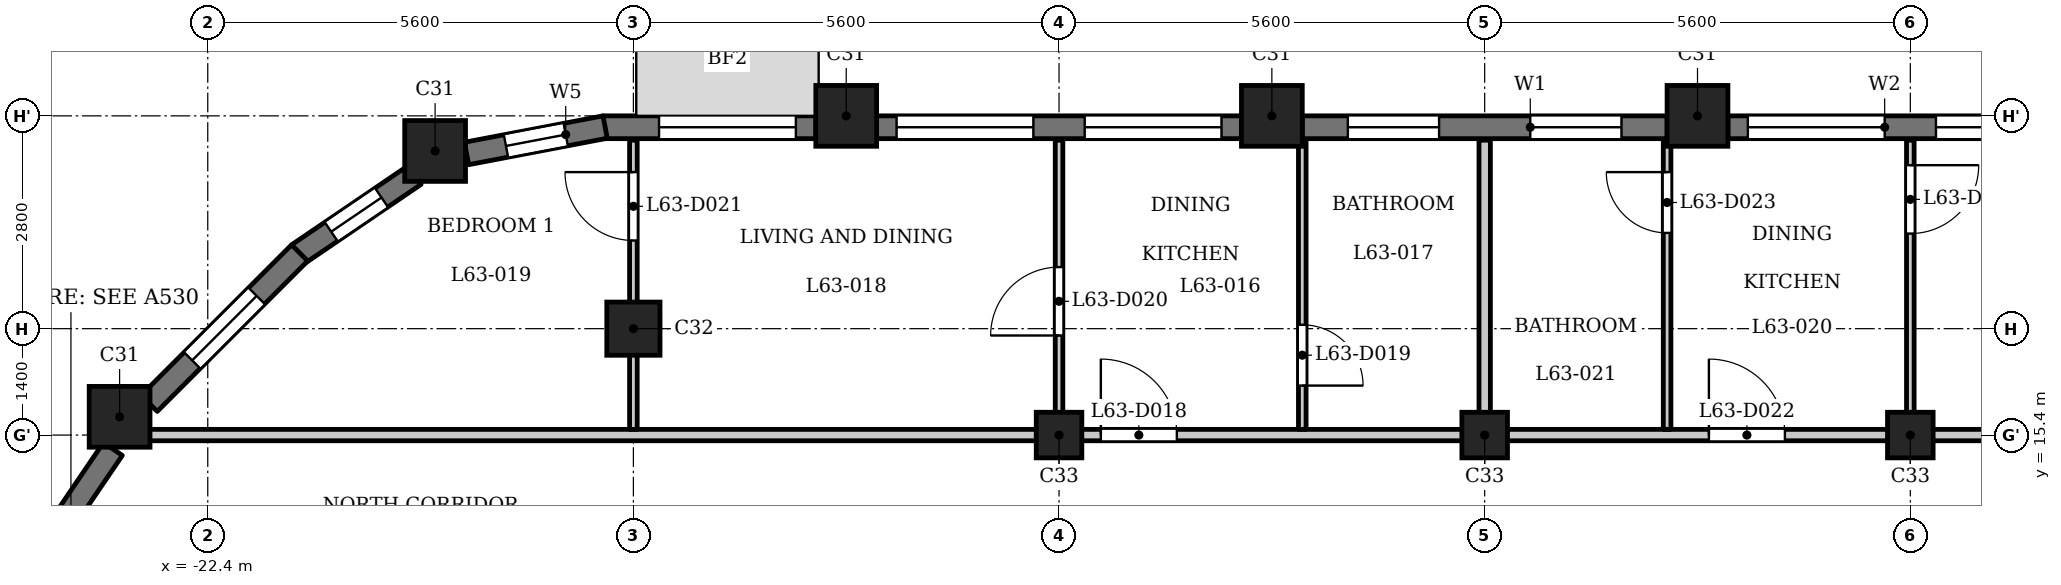
"""IFC4 building model, lengths in metres.
Left out: names, types, materials, properties, quantities, classifications, styles, units other than length and angle.
Written with IfcOpenShell. Run it as: python <this file> out.ifc"""

import sys

from ifc_helpers import new_model, si_unit, direction, frame, frame_2d, origin, origin_2d, place, context, subcontext, project, spatial, rectangle, extrude, element, fill, save


model = new_model("IFC4")
c1 = context("Model", 3, precision=1e-05, world=origin(), true_north=direction((0.0, 1.0)))
c2 = subcontext(c1, "Body", "Model", "MODEL_VIEW")
j1 = project(units=[si_unit("LENGTHUNIT", "METRE"), si_unit("PLANEANGLEUNIT", "RADIAN")], contexts=[c1])
p1 = place(None, origin())
s1 = spatial("IfcSite", under=j1, at=p1, CompositionType="ELEMENT")
p2 = place(p1, origin())
s2 = spatial("IfcBuilding", under=s1, at=p2, CompositionType="ELEMENT")
p3 = place(p2, frame((0.0, 0.0, 245.2)))
s3 = spatial("IfcBuildingStorey", under=s2, at=p3, CompositionType="ELEMENT", Elevation=245.2)
for number, where, z_axis, x_axis in (
    (1, (-2.8, 19.6, 0.0), (0.0, 0.0, 1.0), (1.0, 0.0, 0.0)),
    (2, (-8.4, 19.6, 0.0), (0.0, 0.0, 1.0), (1.0, 0.0, 0.0)),
    (3, (-14.0, 19.6, 0.0), (0.0, 0.0, 1.0), (1.0, 0.0, 0.0)),
    (4, (-19.409, 19.138, 0.0), (0.0, 0.0, 1.0), (1.0, 0.0, 0.0)),
    (5, (-23.56, 15.64, 0.0), (0.0, 0.0, 1.0), (1.0, 0.0, 0.0)),
):
    element("IfcColumn", number, at=place(p3, frame(where, z_axis=z_axis, x_axis=x_axis)), inside=s3, PredefinedType="COLUMN", context=c2, shape_type="SweptSolid", body=[
        extrude(rectangle(XDim=0.8, YDim=0.8, at=origin_2d()), origin(), (0.0, 0.0, 1.0), 3.5),
    ])
p4 = place(p3, frame((-16.8, 16.8, 0.0), z_axis=(0.0, 0.0, 1.0), x_axis=(1.0, 0.0, 0.0)))
e6 = element("IfcColumn", 6, at=p4, inside=s3, PredefinedType="COLUMN", context=c2, shape_type="SweptSolid", body=[
    extrude(rectangle(XDim=0.7, YDim=0.7, at=origin_2d()), origin(), (0.0, 0.0, 1.0), 3.5),
])
for number, where, z_axis, x_axis in (
    (7, (-11.2, 15.4, 0.0), (0.0, 0.0, 1.0), (1.0, 0.0, 0.0)),
    (8, (-5.6, 15.4, 0.0), (0.0, 0.0, 1.0), (1.0, 0.0, 0.0)),
    (9, (0.0, 15.4, 0.0), (0.0, 0.0, 1.0), (1.0, 0.0, 0.0)),
):
    element("IfcColumn", number, at=place(p3, frame(where, z_axis=z_axis, x_axis=x_axis)), inside=s3, PredefinedType="COLUMN", context=c2, shape_type="SweptSolid", body=[
        extrude(rectangle(XDim=0.6, YDim=0.6, at=origin_2d()), origin(), (0.0, 0.0, 1.0), 3.5),
    ])
p5 = place(p3, frame((2.4, 19.45, 0.0), z_axis=(0.0, 0.0, 1.0), x_axis=(-1.0, 0.0, 0.0)))
e10 = element("IfcWall", 10, at=p5, inside=s3, PredefinedType="SOLIDWALL", context=c2, shape_type="SweptSolid", body=[
    extrude(rectangle(XDim=4.8, YDim=0.3, at=frame_2d((2.4, 0.0))), origin(), (0.0, 0.0, 1.0), 2.55),
])
p6 = place(p5, frame((0.262, 0.0, 0.9)))
e11 = element("IfcOpeningElement", 11, at=p6, cuts=e10, PredefinedType="OPENING", context=c2, shape_type="SweptSolid", body=[
    extrude(rectangle(XDim=1.8, YDim=1.25, at=frame_2d((0.9, 0.625))), frame((0.0, 0.16, 0.0), z_axis=(0.0, -1.0, 0.0), x_axis=(1.0, 0.0, 0.0)), (0.0, 0.0, 1.0), 0.32),
])
p7 = place(p5, frame((2.738, 0.0, 0.9)))
e12 = element("IfcOpeningElement", 12, at=p7, cuts=e10, PredefinedType="OPENING", context=c2, shape_type="SweptSolid", body=[
    extrude(rectangle(XDim=1.8, YDim=1.25, at=frame_2d((0.9, 0.625))), frame((0.0, 0.16, 0.0), z_axis=(0.0, -1.0, 0.0), x_axis=(1.0, 0.0, 0.0)), (0.0, 0.0, 1.0), 0.32),
])
p8 = place(p3, frame((-3.2, 19.45, 0.0), z_axis=(0.0, 0.0, 1.0), x_axis=(-1.0, 0.0, 0.0)))
e13 = element("IfcWall", 13, at=p8, inside=s3, PredefinedType="SOLIDWALL", context=c2, shape_type="SweptSolid", body=[
    extrude(rectangle(XDim=4.8, YDim=0.3, at=frame_2d((2.4, 0.0))), origin(), (0.0, 0.0, 1.0), 2.55),
])
p9 = place(p8, frame((0.6, 0.0, 0.6)))
e14 = element("IfcOpeningElement", 14, at=p9, cuts=e13, PredefinedType="OPENING", context=c2, shape_type="SweptSolid", body=[
    extrude(rectangle(XDim=1.2, YDim=1.55, at=frame_2d((0.6, 0.775))), frame((0.0, 0.16, 0.0), z_axis=(0.0, -1.0, 0.0), x_axis=(1.0, 0.0, 0.0)), (0.0, 0.0, 1.0), 0.32),
])
p10 = place(p8, frame((3.0, 0.0, 0.6)))
e15 = element("IfcOpeningElement", 15, at=p10, cuts=e13, PredefinedType="OPENING", context=c2, shape_type="SweptSolid", body=[
    extrude(rectangle(XDim=1.2, YDim=1.55, at=frame_2d((0.6, 0.775))), frame((0.0, 0.16, 0.0), z_axis=(0.0, -1.0, 0.0), x_axis=(1.0, 0.0, 0.0)), (0.0, 0.0, 1.0), 0.32),
])
p11 = place(p3, frame((-8.8, 19.45, 0.0), z_axis=(0.0, 0.0, 1.0), x_axis=(-1.0, 0.0, 0.0)))
e16 = element("IfcWall", 16, at=p11, inside=s3, PredefinedType="SOLIDWALL", context=c2, shape_type="SweptSolid", body=[
    extrude(rectangle(XDim=4.8, YDim=0.3, at=frame_2d((2.4, 0.0))), origin(), (0.0, 0.0, 1.0), 2.55),
])
p12 = place(p11, frame((0.262, 0.0, 0.9)))
e17 = element("IfcOpeningElement", 17, at=p12, cuts=e16, PredefinedType="OPENING", context=c2, shape_type="SweptSolid", body=[
    extrude(rectangle(XDim=1.8, YDim=1.25, at=frame_2d((0.9, 0.625))), frame((0.0, 0.16, 0.0), z_axis=(0.0, -1.0, 0.0), x_axis=(1.0, 0.0, 0.0)), (0.0, 0.0, 1.0), 0.32),
])
p13 = place(p11, frame((2.738, 0.0, 0.9)))
e18 = element("IfcOpeningElement", 18, at=p13, cuts=e16, PredefinedType="OPENING", context=c2, shape_type="SweptSolid", body=[
    extrude(rectangle(XDim=1.8, YDim=1.25, at=frame_2d((0.9, 0.625))), frame((0.0, 0.16, 0.0), z_axis=(0.0, -1.0, 0.0), x_axis=(1.0, 0.0, 0.0)), (0.0, 0.0, 1.0), 0.32),
])
p14 = place(p3, frame((-14.4, 19.45, 0.0), z_axis=(0.0, 0.0, 1.0), x_axis=(-1.0, 0.0, 0.0)))
e19 = element("IfcWall", 19, at=p14, inside=s3, PredefinedType="SOLIDWALL", context=c2, shape_type="SweptSolid", body=[
    extrude(rectangle(XDim=2.8, YDim=0.3, at=frame_2d((1.4, 0.0))), origin(), (0.0, 0.0, 1.0), 2.55),
])
p15 = place(p14, frame((0.262, 0.0, 0.9)))
e20 = element("IfcOpeningElement", 20, at=p15, cuts=e19, PredefinedType="OPENING", context=c2, shape_type="SweptSolid", body=[
    extrude(rectangle(XDim=1.8, YDim=1.25, at=frame_2d((0.9, 0.625))), frame((0.0, 0.16, 0.0), z_axis=(0.0, -1.0, 0.0), x_axis=(1.0, 0.0, 0.0)), (0.0, 0.0, 1.0), 0.32),
])
p16 = place(p3, frame((-17.172, 19.453, 0.0), z_axis=(0.0, 0.0, 1.0), x_axis=(-0.982301706131, -0.187305520826, 0.0)))
e21 = element("IfcWall", 21, at=p16, inside=s3, PredefinedType="SOLIDWALL", context=c2, shape_type="SweptSolid", body=[
    extrude(rectangle(XDim=1.856, YDim=0.3, at=frame_2d((0.928, 0.0))), origin(), (0.0, 0.0, 1.0), 2.55),
])
p17 = place(p16, frame((0.528, 0.0, 0.6)))
e22 = element("IfcOpeningElement", 22, at=p17, cuts=e21, PredefinedType="OPENING", context=c2, shape_type="SweptSolid", body=[
    extrude(rectangle(XDim=0.8, YDim=1.55, at=frame_2d((0.4, 0.775))), frame((0.0, 0.16, 0.0), z_axis=(0.0, -1.0, 0.0), x_axis=(1.0, 0.0, 0.0)), (0.0, 0.0, 1.0), 0.32),
])
p18 = place(p3, frame((-19.678, 18.822, 0.0), z_axis=(0.0, 0.0, 1.0), x_axis=(-0.826997446962, -0.562205676526, 0.0)))
e23 = element("IfcWall", 23, at=p18, inside=s3, PredefinedType="SOLIDWALL", context=c2, shape_type="SweptSolid", body=[
    extrude(rectangle(XDim=1.856, YDim=0.3, at=frame_2d((0.928, 0.0))), origin(), (0.0, 0.0, 1.0), 2.55),
])
p19 = place(p18, frame((0.528, 0.0, 0.6)))
e24 = element("IfcOpeningElement", 24, at=p19, cuts=e23, PredefinedType="OPENING", context=c2, shape_type="SweptSolid", body=[
    extrude(rectangle(XDim=0.8, YDim=1.55, at=frame_2d((0.4, 0.775))), frame((0.0, 0.16, 0.0), z_axis=(0.0, -1.0, 0.0), x_axis=(1.0, 0.0, 0.0)), (0.0, 0.0, 1.0), 0.32),
])
p20 = place(p3, frame((-21.191, 17.797, 0.0), z_axis=(0.0, 0.0, 1.0), x_axis=(-0.707106781187, -0.707106781187, 0.0)))
e25 = element("IfcWall", 25, at=p20, inside=s3, PredefinedType="SOLIDWALL", context=c2, shape_type="SweptSolid", body=[
    extrude(rectangle(XDim=2.8, YDim=0.3, at=frame_2d((1.4, 0.0))), origin(), (0.0, 0.0, 1.0), 2.55),
])
p21 = place(p20, frame((0.8, 0.0, 0.6)))
e26 = element("IfcOpeningElement", 26, at=p21, cuts=e25, PredefinedType="OPENING", context=c2, shape_type="SweptSolid", body=[
    extrude(rectangle(XDim=1.2, YDim=1.55, at=frame_2d((0.6, 0.775))), frame((0.0, 0.16, 0.0), z_axis=(0.0, -1.0, 0.0), x_axis=(1.0, 0.0, 0.0)), (0.0, 0.0, 1.0), 0.32),
])
p22 = place(p3, frame((-23.648, 15.217, 0.0), z_axis=(0.0, 0.0, 1.0), x_axis=(-0.562043265151, -0.827107833416, 0.0)))
e27 = element("IfcWall", 27, at=p22, inside=s3, PredefinedType="SOLIDWALL", context=c2, shape_type="SweptSolid", body=[
    extrude(rectangle(XDim=1.377, YDim=0.3, at=frame_2d((0.688, 0.0))), origin(), (0.0, 0.0, 1.0), 2.55),
])
p23 = place(p3, frame((-23.55, 15.4, 0.0), z_axis=(0.0, 0.0, 1.0), x_axis=(1.0, 0.0, 0.0)))
e28 = element("IfcWall", 28, at=p23, inside=s3, PredefinedType="PARTITIONING", context=c2, shape_type="SweptSolid", body=[
    extrude(rectangle(XDim=46.872, YDim=0.15, at=frame_2d((23.436, 0.0))), origin(), (0.0, 0.0, 1.0), 3.2),
])
p24 = place(p23, frame((12.9, 0.0, 0.0)))
e29 = element("IfcOpeningElement", 29, at=p24, cuts=e28, PredefinedType="OPENING", context=c2, shape_type="SweptSolid", body=[
    extrude(rectangle(XDim=1.0, YDim=2.1, at=frame_2d((0.5, 1.05))), frame((0.0, 0.085, 0.0), z_axis=(0.0, -1.0, 0.0), x_axis=(1.0, 0.0, 0.0)), (0.0, 0.0, 1.0), 0.17),
])
p25 = place(p23, frame((20.9, 0.0, 0.0)))
e30 = element("IfcOpeningElement", 30, at=p25, cuts=e28, PredefinedType="OPENING", context=c2, shape_type="SweptSolid", body=[
    extrude(rectangle(XDim=1.0, YDim=2.1, at=frame_2d((0.5, 1.05))), frame((0.0, 0.085, 0.0), z_axis=(0.0, -1.0, 0.0), x_axis=(1.0, 0.0, 0.0)), (0.0, 0.0, 1.0), 0.17),
])
p26 = place(p23, frame((37.7, 0.0, 0.0)))
e31 = element("IfcOpeningElement", 31, at=p26, cuts=e28, PredefinedType="OPENING", context=c2, shape_type="SweptSolid", body=[
    extrude(rectangle(XDim=1.0, YDim=2.1, at=frame_2d((0.5, 1.05))), frame((0.0, 0.085, 0.0), z_axis=(0.0, -1.0, 0.0), x_axis=(1.0, 0.0, 0.0)), (0.0, 0.0, 1.0), 0.17),
])
p27 = place(p3, frame((-16.8, 15.475, 0.0), z_axis=(0.0, 0.0, 1.0), x_axis=(0.0, 1.0, 0.0)))
e32 = element("IfcWall", 32, at=p27, inside=s3, PredefinedType="PARTITIONING", context=c2, shape_type="SweptSolid", body=[
    extrude(rectangle(XDim=3.805, YDim=0.1, at=frame_2d((1.902, 0.0))), origin(), (0.0, 0.0, 1.0), 3.2),
])
p28 = place(p27, frame((2.485, 0.0, 0.0)))
e33 = element("IfcOpeningElement", 33, at=p28, cuts=e32, PredefinedType="OPENING", context=c2, shape_type="SweptSolid", body=[
    extrude(rectangle(XDim=0.9, YDim=2.1, at=frame_2d((0.45, 1.05))), frame((0.0, 0.06, 0.0), z_axis=(0.0, -1.0, 0.0), x_axis=(1.0, 0.0, 0.0)), (0.0, 0.0, 1.0), 0.12),
])
p29 = place(p3, frame((-11.2, 15.475, 0.0), z_axis=(0.0, 0.0, 1.0), x_axis=(0.0, 1.0, 0.0)))
e34 = element("IfcWall", 34, at=p29, inside=s3, PredefinedType="PARTITIONING", context=c2, shape_type="SweptSolid", body=[
    extrude(rectangle(XDim=3.805, YDim=0.1, at=frame_2d((1.902, 0.0))), origin(), (0.0, 0.0, 1.0), 3.2),
])
p30 = place(p29, frame((1.235, 0.0, 0.0)))
e35 = element("IfcOpeningElement", 35, at=p30, cuts=e34, PredefinedType="OPENING", context=c2, shape_type="SweptSolid", body=[
    extrude(rectangle(XDim=0.9, YDim=2.1, at=frame_2d((0.45, 1.05))), frame((0.0, 0.06, 0.0), z_axis=(0.0, -1.0, 0.0), x_axis=(1.0, 0.0, 0.0)), (0.0, 0.0, 1.0), 0.12),
])
p31 = place(p3, frame((-8.0, 15.475, 0.0), z_axis=(0.0, 0.0, 1.0), x_axis=(0.0, 1.0, 0.0)))
e36 = element("IfcWall", 36, at=p31, inside=s3, PredefinedType="PARTITIONING", context=c2, shape_type="SweptSolid", body=[
    extrude(rectangle(XDim=3.805, YDim=0.1, at=frame_2d((1.902, 0.0))), origin(), (0.0, 0.0, 1.0), 3.2),
])
p32 = place(p31, frame((0.576, 0.0, 0.0)))
e37 = element("IfcOpeningElement", 37, at=p32, cuts=e36, PredefinedType="OPENING", context=c2, shape_type="SweptSolid", body=[
    extrude(rectangle(XDim=0.8, YDim=2.1, at=frame_2d((0.4, 1.05))), frame((0.0, 0.06, 0.0), z_axis=(0.0, -1.0, 0.0), x_axis=(1.0, 0.0, 0.0)), (0.0, 0.0, 1.0), 0.12),
])
p33 = place(p3, frame((-5.6, 15.475, 0.0), z_axis=(0.0, 0.0, 1.0), x_axis=(0.0, 1.0, 0.0)))
e38 = element("IfcWall", 38, at=p33, inside=s3, PredefinedType="PARTITIONING", context=c2, shape_type="SweptSolid", body=[
    extrude(rectangle(XDim=3.805, YDim=0.15, at=frame_2d((1.902, 0.0))), origin(), (0.0, 0.0, 1.0), 3.2),
])
p34 = place(p3, frame((-3.2, 15.475, 0.0), z_axis=(0.0, 0.0, 1.0), x_axis=(0.0, 1.0, 0.0)))
e39 = element("IfcWall", 39, at=p34, inside=s3, PredefinedType="PARTITIONING", context=c2, shape_type="SweptSolid", body=[
    extrude(rectangle(XDim=3.805, YDim=0.1, at=frame_2d((1.902, 0.0))), origin(), (0.0, 0.0, 1.0), 3.2),
])
p35 = place(p34, frame((2.585, 0.0, 0.0)))
e40 = element("IfcOpeningElement", 40, at=p35, cuts=e39, PredefinedType="OPENING", context=c2, shape_type="SweptSolid", body=[
    extrude(rectangle(XDim=0.8, YDim=2.1, at=frame_2d((0.4, 1.05))), frame((0.0, 0.06, 0.0), z_axis=(0.0, -1.0, 0.0), x_axis=(1.0, 0.0, 0.0)), (0.0, 0.0, 1.0), 0.12),
])
p36 = place(p3, frame((0.0, 15.475, 0.0), z_axis=(0.0, 0.0, 1.0), x_axis=(0.0, 1.0, 0.0)))
e41 = element("IfcWall", 41, at=p36, inside=s3, PredefinedType="PARTITIONING", context=c2, shape_type="SweptSolid", body=[
    extrude(rectangle(XDim=3.805, YDim=0.1, at=frame_2d((1.902, 0.0))), origin(), (0.0, 0.0, 1.0), 3.2),
])
p37 = place(p36, frame((2.576, 0.0, 0.0)))
e42 = element("IfcOpeningElement", 42, at=p37, cuts=e41, PredefinedType="OPENING", context=c2, shape_type="SweptSolid", body=[
    extrude(rectangle(XDim=0.9, YDim=2.1, at=frame_2d((0.45, 1.05))), frame((0.0, 0.06, 0.0), z_axis=(0.0, -1.0, 0.0), x_axis=(1.0, 0.0, 0.0)), (0.0, 0.0, 1.0), 0.12),
])
p38 = place(p24, origin())
e43 = element("IfcDoor", 43, at=p38, inside=s3, OperationType="SINGLE_SWING_RIGHT", PredefinedType="DOOR", context=c2, shape_type="SweptSolid", body=[
    extrude(rectangle(XDim=1.0, YDim=2.1, at=frame_2d((0.5, 1.05))), frame((0.0, 0.025, 0.0), z_axis=(0.0, -1.0, 0.0), x_axis=(1.0, 0.0, 0.0)), (0.0, 0.0, 1.0), 0.05),
])
fill(e29, e43)
p39 = place(p32, origin())
e44 = element("IfcDoor", 44, at=p39, inside=s3, OperationType="SINGLE_SWING_LEFT", PredefinedType="DOOR", context=c2, shape_type="SweptSolid", body=[
    extrude(rectangle(XDim=0.8, YDim=2.1, at=frame_2d((0.4, 1.05))), frame((0.0, 0.025, 0.0), z_axis=(0.0, -1.0, 0.0), x_axis=(1.0, 0.0, 0.0)), (0.0, 0.0, 1.0), 0.05),
])
fill(e37, e44)
p40 = place(p30, origin())
e45 = element("IfcDoor", 45, at=p40, inside=s3, OperationType="SINGLE_SWING_RIGHT", PredefinedType="DOOR", context=c2, shape_type="SweptSolid", body=[
    extrude(rectangle(XDim=0.9, YDim=2.1, at=frame_2d((0.45, 1.05))), frame((0.0, 0.025, 0.0), z_axis=(0.0, -1.0, 0.0), x_axis=(1.0, 0.0, 0.0)), (0.0, 0.0, 1.0), 0.05),
])
fill(e35, e45)
p41 = place(p28, origin())
e46 = element("IfcDoor", 46, at=p41, inside=s3, OperationType="SINGLE_SWING_LEFT", PredefinedType="DOOR", context=c2, shape_type="SweptSolid", body=[
    extrude(rectangle(XDim=0.9, YDim=2.1, at=frame_2d((0.45, 1.05))), frame((0.0, 0.025, 0.0), z_axis=(0.0, -1.0, 0.0), x_axis=(1.0, 0.0, 0.0)), (0.0, 0.0, 1.0), 0.05),
])
fill(e33, e46)
p42 = place(p25, origin())
e47 = element("IfcDoor", 47, at=p42, inside=s3, OperationType="SINGLE_SWING_RIGHT", PredefinedType="DOOR", context=c2, shape_type="SweptSolid", body=[
    extrude(rectangle(XDim=1.0, YDim=2.1, at=frame_2d((0.5, 1.05))), frame((0.0, 0.025, 0.0), z_axis=(0.0, -1.0, 0.0), x_axis=(1.0, 0.0, 0.0)), (0.0, 0.0, 1.0), 0.05),
])
fill(e30, e47)
p43 = place(p35, origin())
e48 = element("IfcDoor", 48, at=p43, inside=s3, OperationType="SINGLE_SWING_LEFT", PredefinedType="DOOR", context=c2, shape_type="SweptSolid", body=[
    extrude(rectangle(XDim=0.8, YDim=2.1, at=frame_2d((0.4, 1.05))), frame((0.0, 0.025, 0.0), z_axis=(0.0, -1.0, 0.0), x_axis=(1.0, 0.0, 0.0)), (0.0, 0.0, 1.0), 0.05),
])
fill(e40, e48)
p44 = place(p37, origin())
e49 = element("IfcDoor", 49, at=p44, inside=s3, OperationType="SINGLE_SWING_RIGHT", PredefinedType="DOOR", context=c2, shape_type="SweptSolid", body=[
    extrude(rectangle(XDim=0.9, YDim=2.1, at=frame_2d((0.45, 1.05))), frame((0.0, 0.025, 0.0), z_axis=(0.0, -1.0, 0.0), x_axis=(1.0, 0.0, 0.0)), (0.0, 0.0, 1.0), 0.05),
])
fill(e42, e49)
p45 = place(p6, origin())
e50 = element("IfcWindow", 50, at=p45, inside=s3, PartitioningType="SINGLE_PANEL", PredefinedType="WINDOW", context=c2, shape_type="SweptSolid", body=[
    extrude(rectangle(XDim=1.8, YDim=1.25, at=frame_2d((0.9, 0.625))), frame((0.0, 0.03, 0.0), z_axis=(0.0, -1.0, 0.0), x_axis=(1.0, 0.0, 0.0)), (0.0, 0.0, 1.0), 0.06),
])
fill(e11, e50)
p46 = place(p7, origin())
e51 = element("IfcWindow", 51, at=p46, inside=s3, PartitioningType="SINGLE_PANEL", PredefinedType="WINDOW", context=c2, shape_type="SweptSolid", body=[
    extrude(rectangle(XDim=1.8, YDim=1.25, at=frame_2d((0.9, 0.625))), frame((0.0, 0.03, 0.0), z_axis=(0.0, -1.0, 0.0), x_axis=(1.0, 0.0, 0.0)), (0.0, 0.0, 1.0), 0.06),
])
fill(e12, e51)
p47 = place(p9, origin())
e52 = element("IfcWindow", 52, at=p47, inside=s3, PartitioningType="SINGLE_PANEL", PredefinedType="WINDOW", context=c2, shape_type="SweptSolid", body=[
    extrude(rectangle(XDim=1.2, YDim=1.55, at=frame_2d((0.6, 0.775))), frame((0.0, 0.03, 0.0), z_axis=(0.0, -1.0, 0.0), x_axis=(1.0, 0.0, 0.0)), (0.0, 0.0, 1.0), 0.06),
])
fill(e14, e52)
p48 = place(p10, origin())
e53 = element("IfcWindow", 53, at=p48, inside=s3, PartitioningType="SINGLE_PANEL", PredefinedType="WINDOW", context=c2, shape_type="SweptSolid", body=[
    extrude(rectangle(XDim=1.2, YDim=1.55, at=frame_2d((0.6, 0.775))), frame((0.0, 0.03, 0.0), z_axis=(0.0, -1.0, 0.0), x_axis=(1.0, 0.0, 0.0)), (0.0, 0.0, 1.0), 0.06),
])
fill(e15, e53)
p49 = place(p12, origin())
e54 = element("IfcWindow", 54, at=p49, inside=s3, PartitioningType="SINGLE_PANEL", PredefinedType="WINDOW", context=c2, shape_type="SweptSolid", body=[
    extrude(rectangle(XDim=1.8, YDim=1.25, at=frame_2d((0.9, 0.625))), frame((0.0, 0.03, 0.0), z_axis=(0.0, -1.0, 0.0), x_axis=(1.0, 0.0, 0.0)), (0.0, 0.0, 1.0), 0.06),
])
fill(e17, e54)
p50 = place(p13, origin())
e55 = element("IfcWindow", 55, at=p50, inside=s3, PartitioningType="SINGLE_PANEL", PredefinedType="WINDOW", context=c2, shape_type="SweptSolid", body=[
    extrude(rectangle(XDim=1.8, YDim=1.25, at=frame_2d((0.9, 0.625))), frame((0.0, 0.03, 0.0), z_axis=(0.0, -1.0, 0.0), x_axis=(1.0, 0.0, 0.0)), (0.0, 0.0, 1.0), 0.06),
])
fill(e18, e55)
p51 = place(p15, origin())
e56 = element("IfcWindow", 56, at=p51, inside=s3, PartitioningType="SINGLE_PANEL", PredefinedType="WINDOW", context=c2, shape_type="SweptSolid", body=[
    extrude(rectangle(XDim=1.8, YDim=1.25, at=frame_2d((0.9, 0.625))), frame((0.0, 0.03, 0.0), z_axis=(0.0, -1.0, 0.0), x_axis=(1.0, 0.0, 0.0)), (0.0, 0.0, 1.0), 0.06),
])
fill(e20, e56)
p52 = place(p17, origin())
e57 = element("IfcWindow", 57, at=p52, inside=s3, PartitioningType="SINGLE_PANEL", PredefinedType="WINDOW", context=c2, shape_type="SweptSolid", body=[
    extrude(rectangle(XDim=0.8, YDim=1.55, at=frame_2d((0.4, 0.775))), frame((0.0, 0.03, 0.0), z_axis=(0.0, -1.0, 0.0), x_axis=(1.0, 0.0, 0.0)), (0.0, 0.0, 1.0), 0.06),
])
fill(e22, e57)
p53 = place(p19, origin())
e58 = element("IfcWindow", 58, at=p53, inside=s3, PartitioningType="SINGLE_PANEL", PredefinedType="WINDOW", context=c2, shape_type="SweptSolid", body=[
    extrude(rectangle(XDim=0.8, YDim=1.55, at=frame_2d((0.4, 0.775))), frame((0.0, 0.03, 0.0), z_axis=(0.0, -1.0, 0.0), x_axis=(1.0, 0.0, 0.0)), (0.0, 0.0, 1.0), 0.06),
])
fill(e24, e58)
p54 = place(p21, origin())
e59 = element("IfcWindow", 59, at=p54, inside=s3, PartitioningType="SINGLE_PANEL", PredefinedType="WINDOW", context=c2, shape_type="SweptSolid", body=[
    extrude(rectangle(XDim=1.2, YDim=1.55, at=frame_2d((0.6, 0.775))), frame((0.0, 0.03, 0.0), z_axis=(0.0, -1.0, 0.0), x_axis=(1.0, 0.0, 0.0)), (0.0, 0.0, 1.0), 0.06),
])
fill(e26, e59)
save(model, sys.argv[1])
